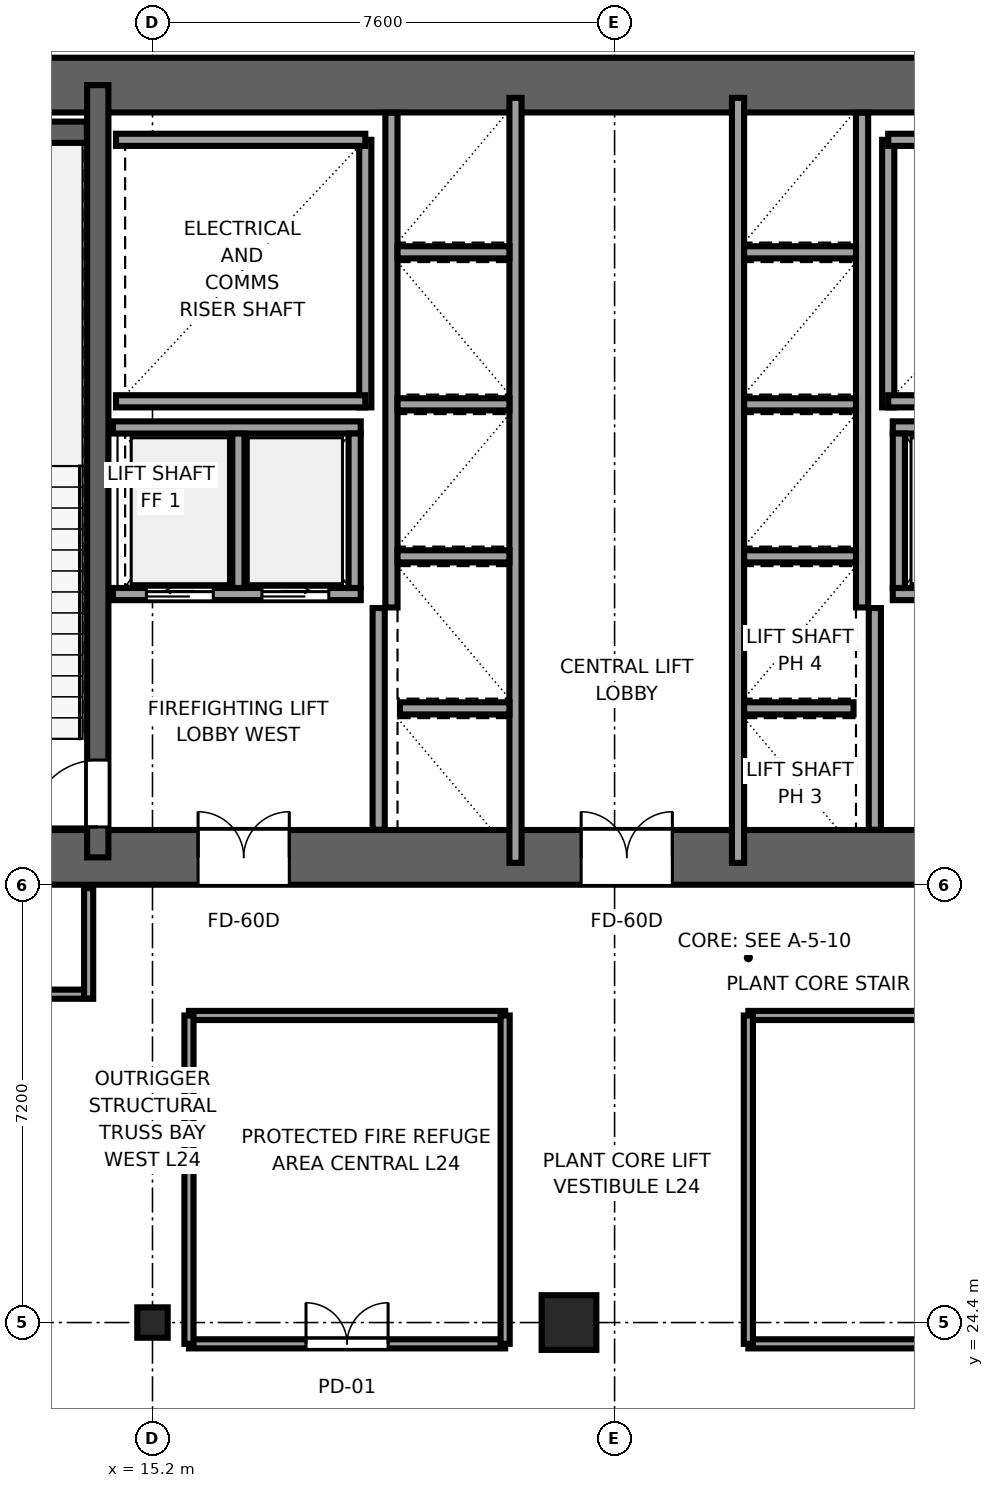
"""IFC4 building model, lengths in metres.
Left out: names, types, materials, properties, quantities, classifications, styles, units other than length and angle.
Written with IfcOpenShell. Run it as: python <this file> out.ifc"""

import sys

from ifc_helpers import new_model, si_unit, direction, frame, frame_2d, origin, origin_2d, place, context, subcontext, project, spatial, rectangle, i_section, extrude, source, transform, mapped, element, fill, save


model = new_model("IFC4")
c1 = context("Model", 3, precision=1e-05, world=origin(), true_north=direction((0.0, 1.0)))
c2 = subcontext(c1, "Body", "Model", "MODEL_VIEW")
j1 = project(units=[si_unit("LENGTHUNIT", "METRE"), si_unit("PLANEANGLEUNIT", "RADIAN")], contexts=[c1])
p1 = place(None, origin())
s1 = spatial("IfcSite", under=j1, at=p1, CompositionType="ELEMENT")
p2 = place(p1, origin())
s2 = spatial("IfcBuilding", under=s1, at=p2, CompositionType="ELEMENT")
p3 = place(p2, frame((0.0, 0.0, 95.9)))
s3 = spatial("IfcBuildingStorey", under=s2, at=p3, CompositionType="ELEMENT", Elevation=95.9)
p4 = place(p3, frame((9.6, 32.05, 0.0), z_axis=(0.0, 0.0, 1.0), x_axis=(1.0, 0.0, 0.0)))
e1 = element("IfcWall", 1, at=p4, inside=s3, PredefinedType="SHEAR", context=c2, shape_type="SweptSolid", body=[
    extrude(rectangle(XDim=26.8, YDim=0.9, at=frame_2d((13.4, 0.0))), origin(), (0.0, 0.0, 1.0), 5.0),
])
p5 = place(p4, frame((7.85, 0.0, 0.0), z_axis=(0.0, 0.0, 1.0), x_axis=(-1.0, 0.0, 0.0)))
e2 = element("IfcOpeningElement", 2, at=p5, cuts=e1, PredefinedType="OPENING", context=c2, shape_type="SweptSolid", body=[
    extrude(rectangle(XDim=1.5, YDim=2.04, at=frame_2d((0.75, 1.02))), frame((0.0, 0.46, 0.0), z_axis=(0.0, -1.0, 0.0), x_axis=(1.0, 0.0, 0.0)), (0.0, 0.0, 1.0), 0.92),
])
p6 = place(p4, frame((14.15, 0.0, 0.0), z_axis=(0.0, 0.0, 1.0), x_axis=(-1.0, 0.0, 0.0)))
e3 = element("IfcOpeningElement", 3, at=p6, cuts=e1, PredefinedType="OPENING", context=c2, shape_type="SweptSolid", body=[
    extrude(rectangle(XDim=1.5, YDim=2.04, at=frame_2d((0.75, 1.02))), frame((0.0, 0.46, 0.0), z_axis=(0.0, -1.0, 0.0), x_axis=(1.0, 0.0, 0.0)), (0.0, 0.0, 1.0), 0.92),
])
p7 = place(p4, frame((20.45, 0.0, 0.0), z_axis=(0.0, 0.0, 1.0), x_axis=(-1.0, 0.0, 0.0)))
e4 = element("IfcOpeningElement", 4, at=p7, cuts=e1, PredefinedType="OPENING", context=c2, shape_type="SweptSolid", body=[
    extrude(rectangle(XDim=1.5, YDim=2.04, at=frame_2d((0.75, 1.02))), frame((0.0, 0.46, 0.0), z_axis=(0.0, -1.0, 0.0), x_axis=(1.0, 0.0, 0.0)), (0.0, 0.0, 1.0), 0.92),
])
p8 = place(p3, frame((9.6, 44.75, 0.0), z_axis=(0.0, 0.0, 1.0), x_axis=(1.0, 0.0, 0.0)))
e5 = element("IfcWall", 5, at=p8, inside=s3, PredefinedType="SHEAR", context=c2, shape_type="SweptSolid", body=[
    extrude(rectangle(XDim=26.8, YDim=0.9, at=frame_2d((13.4, 0.0))), origin(), (0.0, 0.0, 1.0), 5.0),
])
p9 = place(p3, frame((14.3, 32.05, 0.0), z_axis=(0.0, 0.0, 1.0), x_axis=(0.0, 1.0, 0.0)))
e6 = element("IfcWall", 6, at=p9, inside=s3, PredefinedType="SHEAR", context=c2, shape_type="SweptSolid", body=[
    extrude(rectangle(XDim=12.7, YDim=0.35, at=frame_2d((6.35, 0.0))), origin(), (0.0, 0.0, 1.0), 5.0),
])
p10 = place(p9, frame((0.5, 0.0, 0.0)))
e7 = element("IfcOpeningElement", 7, at=p10, cuts=e6, PredefinedType="OPENING", context=c2, shape_type="SweptSolid", body=[
    extrude(rectangle(XDim=1.1, YDim=2.12, at=frame_2d((0.55, 1.06))), frame((0.0, 0.185, 0.0), z_axis=(0.0, -1.0, 0.0), x_axis=(1.0, 0.0, 0.0)), (0.0, 0.0, 1.0), 0.37),
])
p11 = place(p3, frame((10.52, 43.975, 0.0), z_axis=(0.0, 0.0, 1.0), x_axis=(1.0, 0.0, 0.0)))
e8 = element("IfcWall", 8, at=p11, inside=s3, PredefinedType="SHEAR", context=c2, shape_type="SweptSolid", body=[
    extrude(rectangle(XDim=3.6, YDim=0.35, at=frame_2d((1.8, 0.0))), origin(), (0.0, 0.0, 1.0), 5.0),
])
m1 = source(origin(), c2, "Body", "SweptSolid", [
    extrude(i_section(OverallWidth=0.5, OverallDepth=0.5, WebThickness=0.022, FlangeThickness=0.034, at=origin_2d()), origin(), (0.0, 0.0, 1.0), 5.0),
])
p12 = place(p3, frame((15.2, 24.4, 0.0), z_axis=(0.0, 0.0, 1.0), x_axis=(1.0, 0.0, 0.0)))
e9 = element("IfcColumn", 9, at=p12, inside=s3, PredefinedType="COLUMN", context=c2, shape_type="MappedRepresentation", body=[
    mapped(m1, transform((0.0, 0.0, 0.0), x_axis=(1.0, 0.0, 0.0), y_axis=(0.0, 1.0, 0.0), z_axis=(0.0, 0.0, 1.0), scale=1.0)),
])
m2 = source(origin(), c2, "Body", "SweptSolid", [
    extrude(rectangle(XDim=0.9, YDim=0.9, at=origin_2d()), origin(), (0.0, 0.0, 1.0), 5.0),
])
p13 = place(p3, frame((22.05, 24.4, 0.0), z_axis=(0.0, 0.0, 1.0), x_axis=(1.0, 0.0, 0.0)))
e10 = element("IfcColumn", 10, at=p13, inside=s3, PredefinedType="COLUMN", context=c2, shape_type="MappedRepresentation", body=[
    mapped(m2, transform((0.0, 0.0, 0.0), x_axis=(1.0, 0.0, 0.0), y_axis=(0.0, 1.0, 0.0), z_axis=(0.0, 0.0, 1.0), scale=1.0)),
])
p14 = place(p3, frame((18.7, 39.45, 0.0), z_axis=(0.0, 0.0, 1.0), x_axis=(0.0, 1.0, 0.0)))
e11 = element("IfcWall", 11, at=p14, inside=s3, PredefinedType="SOLIDWALL", context=c2, shape_type="SweptSolid", body=[
    extrude(rectangle(XDim=4.4, YDim=0.2, at=frame_2d((2.2, 0.0))), origin(), (0.0, 0.0, 1.0), 4.82),
])
for number, where, z_axis, x_axis in (
    (12, (14.6, 39.55, 0.0), (0.0, 0.0, 1.0), (1.0, 0.0, 0.0)),
    (13, (14.6, 43.85, 0.0), (0.0, 0.0, 1.0), (1.0, 0.0, 0.0)),
):
    element("IfcWall", number, at=place(p3, frame(where, z_axis=z_axis, x_axis=x_axis)), inside=s3, PredefinedType="SOLIDWALL", context=c2, shape_type="SweptSolid", body=[
        extrude(rectangle(XDim=4.1, YDim=0.2, at=frame_2d((2.05, 0.0))), origin(), (0.0, 0.0, 1.0), 4.82),
    ])
p15 = place(p3, frame((27.3, 39.45, 0.0), z_axis=(0.0, 0.0, 1.0), x_axis=(0.0, 1.0, 0.0)))
e14 = element("IfcWall", 14, at=p15, inside=s3, PredefinedType="SOLIDWALL", context=c2, shape_type="SweptSolid", body=[
    extrude(rectangle(XDim=4.4, YDim=0.2, at=frame_2d((2.2, 0.0))), origin(), (0.0, 0.0, 1.0), 4.82),
])
for number, where, z_axis, x_axis in (
    (15, (27.3, 39.55, 0.0), (0.0, 0.0, 1.0), (1.0, 0.0, 0.0)),
    (16, (27.3, 43.85, 0.0), (0.0, 0.0, 1.0), (1.0, 0.0, 0.0)),
):
    element("IfcWall", number, at=place(p3, frame(where, z_axis=z_axis, x_axis=x_axis)), inside=s3, PredefinedType="SOLIDWALL", context=c2, shape_type="SweptSolid", body=[
        extrude(rectangle(XDim=4.1, YDim=0.2, at=frame_2d((2.05, 0.0))), origin(), (0.0, 0.0, 1.0), 4.82),
    ])
for number, where, z_axis, x_axis in (
    (17, (18.92, 32.504, 0.0), (0.0, 0.0, 1.0), (0.0, 1.0, 0.0)),
    (18, (27.08, 32.504, 0.0), (0.0, 0.0, 1.0), (0.0, 1.0, 0.0)),
):
    element("IfcWall", number, at=place(p3, frame(where, z_axis=z_axis, x_axis=x_axis)), inside=s3, PredefinedType="SOLIDWALL", context=c2, shape_type="SweptSolid", body=[
        extrude(rectangle(XDim=3.646, YDim=0.2, at=frame_2d((1.823, 0.0))), origin(), (0.0, 0.0, 1.0), 4.82),
    ])
p16 = place(p3, frame((21.17, 31.96, 0.0), z_axis=(0.0, 0.0, 1.0), x_axis=(0.0, 1.0, 0.0)))
e19 = element("IfcWall", 19, at=p16, inside=s3, PredefinedType="SOLIDWALL", context=c2, shape_type="SweptSolid", body=[
    extrude(rectangle(XDim=12.58, YDim=0.2, at=frame_2d((6.29, 0.0))), origin(), (0.0, 0.0, 1.0), 4.82),
])
p17 = place(p3, frame((19.13, 36.16, 0.0), z_axis=(0.0, 0.0, 1.0), x_axis=(0.0, 1.0, 0.0)))
e20 = element("IfcWall", 20, at=p17, inside=s3, PredefinedType="SOLIDWALL", context=c2, shape_type="SweptSolid", body=[
    extrude(rectangle(XDim=8.136, YDim=0.2, at=frame_2d((4.068, 0.0))), origin(), (0.0, 0.0, 1.0), 4.82),
])
p18 = place(p3, frame((19.27, 34.5, 0.0), z_axis=(0.0, 0.0, 1.0), x_axis=(1.0, 0.0, 0.0)))
e21 = element("IfcWall", 21, at=p18, inside=s3, PredefinedType="SOLIDWALL", context=c2, shape_type="SweptSolid", body=[
    extrude(rectangle(XDim=1.8, YDim=0.2, at=frame_2d((0.9, 0.0))), origin(), (0.0, 0.0, 1.0), 4.82),
])
for number, where, z_axis, x_axis in (
    (22, (19.23, 37.0, 0.0), (0.0, 0.0, 1.0), (1.0, 0.0, 0.0)),
    (23, (19.23, 39.5, 0.0), (0.0, 0.0, 1.0), (1.0, 0.0, 0.0)),
    (24, (19.23, 42.0, 0.0), (0.0, 0.0, 1.0), (1.0, 0.0, 0.0)),
):
    element("IfcWall", number, at=place(p3, frame(where, z_axis=z_axis, x_axis=x_axis)), inside=s3, PredefinedType="SOLIDWALL", context=c2, shape_type="SweptSolid", body=[
        extrude(rectangle(XDim=1.84, YDim=0.2, at=frame_2d((0.92, 0.0))), origin(), (0.0, 0.0, 1.0), 4.82),
    ])
p19 = place(p3, frame((27.375, 36.38, 0.0), z_axis=(0.0, 0.0, 1.0), x_axis=(1.0, 0.0, 0.0)))
e25 = element("IfcWall", 25, at=p19, inside=s3, PredefinedType="SOLIDWALL", context=c2, shape_type="SweptSolid", body=[
    extrude(rectangle(XDim=4.075, YDim=0.2, at=frame_2d((2.038, 0.0))), origin(), (0.0, 0.0, 1.0), 4.82),
])
p20 = place(p19, frame((0.525, 0.0, 0.0)))
e26 = element("IfcOpeningElement", 26, at=p20, cuts=e25, PredefinedType="OPENING", context=c2, shape_type="SweptSolid", body=[
    extrude(rectangle(XDim=1.1, YDim=2.12, at=frame_2d((0.55, 1.06))), frame((0.0, 0.11, 0.0), z_axis=(0.0, -1.0, 0.0), x_axis=(1.0, 0.0, 0.0)), (0.0, 0.0, 1.0), 0.22),
])
p21 = place(p19, frame((2.425, 0.0, 0.0)))
e27 = element("IfcOpeningElement", 27, at=p21, cuts=e25, PredefinedType="OPENING", context=c2, shape_type="SweptSolid", body=[
    extrude(rectangle(XDim=1.1, YDim=2.12, at=frame_2d((0.55, 1.06))), frame((0.0, 0.11, 0.0), z_axis=(0.0, -1.0, 0.0), x_axis=(1.0, 0.0, 0.0)), (0.0, 0.0, 1.0), 0.22),
])
p22 = place(p3, frame((27.375, 39.12, 0.0), z_axis=(0.0, 0.0, 1.0), x_axis=(1.0, 0.0, 0.0)))
e28 = element("IfcWall", 28, at=p22, inside=s3, PredefinedType="SOLIDWALL", context=c2, shape_type="SweptSolid", body=[
    extrude(rectangle(XDim=4.075, YDim=0.2, at=frame_2d((2.038, 0.0))), origin(), (0.0, 0.0, 1.0), 4.82),
])
p23 = place(p3, frame((27.475, 36.48, 0.0), z_axis=(0.0, 0.0, 1.0), x_axis=(0.0, 1.0, 0.0)))
e29 = element("IfcWall", 29, at=p23, inside=s3, PredefinedType="SOLIDWALL", context=c2, shape_type="SweptSolid", body=[
    extrude(rectangle(XDim=2.54, YDim=0.2, at=frame_2d((1.27, 0.0))), origin(), (0.0, 0.0, 1.0), 4.82),
])
p24 = place(p3, frame((14.55, 36.38, 0.0), z_axis=(0.0, 0.0, 1.0), x_axis=(1.0, 0.0, 0.0)))
e30 = element("IfcWall", 30, at=p24, inside=s3, PredefinedType="SOLIDWALL", context=c2, shape_type="SweptSolid", body=[
    extrude(rectangle(XDim=4.075, YDim=0.2, at=frame_2d((2.038, 0.0))), origin(), (0.0, 0.0, 1.0), 4.82),
])
p25 = place(p24, frame((0.55, 0.0, 0.0)))
e31 = element("IfcOpeningElement", 31, at=p25, cuts=e30, PredefinedType="OPENING", context=c2, shape_type="SweptSolid", body=[
    extrude(rectangle(XDim=1.1, YDim=2.12, at=frame_2d((0.55, 1.06))), frame((0.0, 0.11, 0.0), z_axis=(0.0, -1.0, 0.0), x_axis=(1.0, 0.0, 0.0)), (0.0, 0.0, 1.0), 0.22),
])
p26 = place(p24, frame((2.45, 0.0, 0.0)))
e32 = element("IfcOpeningElement", 32, at=p26, cuts=e30, PredefinedType="OPENING", context=c2, shape_type="SweptSolid", body=[
    extrude(rectangle(XDim=1.1, YDim=2.12, at=frame_2d((0.55, 1.06))), frame((0.0, 0.11, 0.0), z_axis=(0.0, -1.0, 0.0), x_axis=(1.0, 0.0, 0.0)), (0.0, 0.0, 1.0), 0.22),
])
p27 = place(p3, frame((14.55, 39.12, 0.0), z_axis=(0.0, 0.0, 1.0), x_axis=(1.0, 0.0, 0.0)))
e33 = element("IfcWall", 33, at=p27, inside=s3, PredefinedType="SOLIDWALL", context=c2, shape_type="SweptSolid", body=[
    extrude(rectangle(XDim=4.075, YDim=0.2, at=frame_2d((2.038, 0.0))), origin(), (0.0, 0.0, 1.0), 4.82),
])
for number, where, z_axis, x_axis in (
    (34, (18.525, 36.48, 0.0), (0.0, 0.0, 1.0), (0.0, 1.0, 0.0)),
    (35, (16.613, 36.48, 0.0), (0.0, 0.0, 1.0), (0.0, 1.0, 0.0)),
):
    element("IfcWall", number, at=place(p3, frame(where, z_axis=z_axis, x_axis=x_axis)), inside=s3, PredefinedType="SOLIDWALL", context=c2, shape_type="SweptSolid", body=[
        extrude(rectangle(XDim=2.54, YDim=0.2, at=frame_2d((1.27, 0.0))), origin(), (0.0, 0.0, 1.0), 4.82),
    ])
p28 = place(p3, frame((24.83, 31.96, 0.0), z_axis=(0.0, 0.0, 1.0), x_axis=(0.0, 1.0, 0.0)))
e36 = element("IfcWall", 36, at=p28, inside=s3, PredefinedType="SOLIDWALL", context=c2, shape_type="SweptSolid", body=[
    extrude(rectangle(XDim=12.58, YDim=0.2, at=frame_2d((6.29, 0.0))), origin(), (0.0, 0.0, 1.0), 4.82),
])
p29 = place(p3, frame((26.87, 36.16, 0.0), z_axis=(0.0, 0.0, 1.0), x_axis=(0.0, 1.0, 0.0)))
e37 = element("IfcWall", 37, at=p29, inside=s3, PredefinedType="SOLIDWALL", context=c2, shape_type="SweptSolid", body=[
    extrude(rectangle(XDim=8.136, YDim=0.2, at=frame_2d((4.068, 0.0))), origin(), (0.0, 0.0, 1.0), 4.82),
])
p30 = place(p3, frame((24.93, 34.5, 0.0), z_axis=(0.0, 0.0, 1.0), x_axis=(1.0, 0.0, 0.0)))
e38 = element("IfcWall", 38, at=p30, inside=s3, PredefinedType="SOLIDWALL", context=c2, shape_type="SweptSolid", body=[
    extrude(rectangle(XDim=1.8, YDim=0.2, at=frame_2d((0.9, 0.0))), origin(), (0.0, 0.0, 1.0), 4.82),
])
for number, where, z_axis, x_axis in (
    (39, (24.93, 37.0, 0.0), (0.0, 0.0, 1.0), (1.0, 0.0, 0.0)),
    (40, (24.93, 39.5, 0.0), (0.0, 0.0, 1.0), (1.0, 0.0, 0.0)),
    (41, (24.93, 42.0, 0.0), (0.0, 0.0, 1.0), (1.0, 0.0, 0.0)),
):
    element("IfcWall", number, at=place(p3, frame(where, z_axis=z_axis, x_axis=x_axis)), inside=s3, PredefinedType="SOLIDWALL", context=c2, shape_type="SweptSolid", body=[
        extrude(rectangle(XDim=1.84, YDim=0.2, at=frame_2d((0.92, 0.0))), origin(), (0.0, 0.0, 1.0), 4.82),
    ])
p31 = place(p3, frame((15.8, 24.05, 0.0), z_axis=(0.0, 0.0, 1.0), x_axis=(1.0, 0.0, 0.0)))
e42 = element("IfcWall", 42, at=p31, inside=s3, PredefinedType="PARTITIONING", context=c2, shape_type="SweptSolid", body=[
    extrude(rectangle(XDim=5.2, YDim=0.15, at=frame_2d((2.6, 0.0))), origin(), (0.0, 0.0, 1.0), 4.82),
])
p32 = place(p31, frame((1.925, 0.0, 0.0)))
e43 = element("IfcOpeningElement", 43, at=p32, cuts=e42, PredefinedType="OPENING", context=c2, shape_type="SweptSolid", body=[
    extrude(rectangle(XDim=1.35, YDim=2.15, at=frame_2d((0.675, 1.075))), frame((0.0, 0.085, 0.0), z_axis=(0.0, -1.0, 0.0), x_axis=(1.0, 0.0, 0.0)), (0.0, 0.0, 1.0), 0.17),
])
p33 = place(p3, frame((15.8, 29.45, 0.0), z_axis=(0.0, 0.0, 1.0), x_axis=(1.0, 0.0, 0.0)))
e44 = element("IfcWall", 44, at=p33, inside=s3, PredefinedType="PARTITIONING", context=c2, shape_type="SweptSolid", body=[
    extrude(rectangle(XDim=5.2, YDim=0.15, at=frame_2d((2.6, 0.0))), origin(), (0.0, 0.0, 1.0), 4.82),
])
for number, where, z_axis, x_axis in (
    (45, (15.8, 24.05, 0.0), (0.0, 0.0, 1.0), (0.0, 1.0, 0.0)),
    (46, (21.0, 24.05, 0.0), (0.0, 0.0, 1.0), (0.0, 1.0, 0.0)),
):
    element("IfcWall", number, at=place(p3, frame(where, z_axis=z_axis, x_axis=x_axis)), inside=s3, PredefinedType="PARTITIONING", context=c2, shape_type="SweptSolid", body=[
        extrude(rectangle(XDim=5.4, YDim=0.15, at=frame_2d((2.7, 0.0))), origin(), (0.0, 0.0, 1.0), 4.82),
    ])
p34 = place(p3, frame((25.0, 24.05, 0.0), z_axis=(0.0, 0.0, 1.0), x_axis=(1.0, 0.0, 0.0)))
e47 = element("IfcWall", 47, at=p34, inside=s3, PredefinedType="PARTITIONING", context=c2, shape_type="SweptSolid", body=[
    extrude(rectangle(XDim=9.35, YDim=0.15, at=frame_2d((4.675, 0.0))), origin(), (0.0, 0.0, 1.0), 4.82),
])
p35 = place(p34, frame((4.95, 0.0, 0.0)))
e48 = element("IfcOpeningElement", 48, at=p35, cuts=e47, PredefinedType="OPENING", context=c2, shape_type="SweptSolid", body=[
    extrude(rectangle(XDim=1.35, YDim=2.15, at=frame_2d((0.675, 1.075))), frame((0.0, 0.085, 0.0), z_axis=(0.0, -1.0, 0.0), x_axis=(1.0, 0.0, 0.0)), (0.0, 0.0, 1.0), 0.17),
])
p36 = place(p3, frame((25.0, 29.45, 0.0), z_axis=(0.0, 0.0, 1.0), x_axis=(1.0, 0.0, 0.0)))
e49 = element("IfcWall", 49, at=p36, inside=s3, PredefinedType="PARTITIONING", context=c2, shape_type="SweptSolid", body=[
    extrude(rectangle(XDim=9.35, YDim=0.15, at=frame_2d((4.675, 0.0))), origin(), (0.0, 0.0, 1.0), 4.82),
])
p37 = place(p3, frame((25.0, 24.05, 0.0), z_axis=(0.0, 0.0, 1.0), x_axis=(0.0, 1.0, 0.0)))
e50 = element("IfcWall", 50, at=p37, inside=s3, PredefinedType="PARTITIONING", context=c2, shape_type="SweptSolid", body=[
    extrude(rectangle(XDim=5.4, YDim=0.15, at=frame_2d((2.7, 0.0))), origin(), (0.0, 0.0, 1.0), 4.82),
])
p38 = place(p3, frame((9.83, 29.8, 0.0), z_axis=(0.0, 0.0, 1.0), x_axis=(1.0, 0.0, 0.0)))
e51 = element("IfcWall", 51, at=p38, inside=s3, PredefinedType="PARTITIONING", context=c2, shape_type="SweptSolid", body=[
    extrude(rectangle(XDim=4.39, YDim=0.15, at=frame_2d((2.195, 0.0))), origin(), (0.0, 0.0, 1.0), 4.82),
])
p39 = place(p3, frame((14.15, 29.73, 0.0), z_axis=(0.0, 0.0, 1.0), x_axis=(0.0, 1.0, 0.0)))
e52 = element("IfcWall", 52, at=p39, inside=s3, PredefinedType="PARTITIONING", context=c2, shape_type="SweptSolid", body=[
    extrude(rectangle(XDim=1.815, YDim=0.15, at=frame_2d((0.907, 0.0))), origin(), (0.0, 0.0, 1.0), 4.82),
])
m3 = source(origin(), c2, "Body", "SweptSolid", [
    extrude(rectangle(XDim=1.1, YDim=2.12, at=frame_2d((0.55, 1.06))), frame((0.0, 0.025, 0.0), z_axis=(0.0, -1.0, 0.0), x_axis=(1.0, 0.0, 0.0)), (0.0, 0.0, 1.0), 0.05),
])
p40 = place(p10, origin())
e53 = element("IfcDoor", 53, at=p40, inside=s3, OperationType="SINGLE_SWING_LEFT", PredefinedType="DOOR", context=c2, shape_type="MappedRepresentation", body=[
    mapped(m3, transform((0.0, 0.0, 0.0), x_axis=(1.0, 0.0, 0.0), y_axis=(0.0, 1.0, 0.0), z_axis=(0.0, 0.0, 1.0), scale=1.0)),
])
fill(e7, e53)
m4 = source(origin(), c2, "Body", "SweptSolid", [
    extrude(rectangle(XDim=1.5, YDim=2.04, at=frame_2d((0.75, 1.02))), frame((0.0, 0.025, 0.0), z_axis=(0.0, -1.0, 0.0), x_axis=(1.0, 0.0, 0.0)), (0.0, 0.0, 1.0), 0.05),
])
p41 = place(p5, origin())
e54 = element("IfcDoor", 54, at=p41, inside=s3, OperationType="DOUBLE_DOOR_SINGLE_SWING", PredefinedType="DOOR", context=c2, shape_type="MappedRepresentation", body=[
    mapped(m4, transform((0.0, 0.0, 0.0), x_axis=(1.0, 0.0, 0.0), y_axis=(0.0, 1.0, 0.0), z_axis=(0.0, 0.0, 1.0), scale=1.0)),
])
fill(e2, e54)
p42 = place(p6, origin())
e55 = element("IfcDoor", 55, at=p42, inside=s3, OperationType="DOUBLE_DOOR_SINGLE_SWING", PredefinedType="DOOR", context=c2, shape_type="MappedRepresentation", body=[
    mapped(m4, transform((0.0, 0.0, 0.0), x_axis=(1.0, 0.0, 0.0), y_axis=(0.0, 1.0, 0.0), z_axis=(0.0, 0.0, 1.0), scale=1.0)),
])
fill(e3, e55)
m5 = source(origin(), c2, "Body", "SweptSolid", [
    extrude(rectangle(XDim=1.1, YDim=2.12, at=frame_2d((0.55, 1.06))), frame((0.0, 0.025, 0.0), z_axis=(0.0, -1.0, 0.0), x_axis=(1.0, 0.0, 0.0)), (0.0, 0.0, 1.0), 0.05),
])
p43 = place(p25, origin())
e56 = element("IfcDoor", 56, at=p43, inside=s3, OperationType="SLIDING_TO_LEFT", PredefinedType="DOOR", context=c2, shape_type="MappedRepresentation", body=[
    mapped(m5, transform((0.0, 0.0, 0.0), x_axis=(1.0, 0.0, 0.0), y_axis=(0.0, 1.0, 0.0), z_axis=(0.0, 0.0, 1.0), scale=1.0)),
])
fill(e31, e56)
p44 = place(p26, origin())
e57 = element("IfcDoor", 57, at=p44, inside=s3, OperationType="SLIDING_TO_RIGHT", PredefinedType="DOOR", context=c2, shape_type="MappedRepresentation", body=[
    mapped(m5, transform((0.0, 0.0, 0.0), x_axis=(1.0, 0.0, 0.0), y_axis=(0.0, 1.0, 0.0), z_axis=(0.0, 0.0, 1.0), scale=1.0)),
])
fill(e32, e57)
m6 = source(origin(), c2, "Body", "SweptSolid", [
    extrude(rectangle(XDim=1.35, YDim=2.15, at=frame_2d((0.675, 1.075))), frame((0.0, 0.025, 0.0), z_axis=(0.0, -1.0, 0.0), x_axis=(1.0, 0.0, 0.0)), (0.0, 0.0, 1.0), 0.05),
])
p45 = place(p32, origin())
e58 = element("IfcDoor", 58, at=p45, inside=s3, OperationType="DOUBLE_DOOR_SINGLE_SWING", PredefinedType="DOOR", context=c2, shape_type="MappedRepresentation", body=[
    mapped(m6, transform((0.0, 0.0, 0.0), x_axis=(1.0, 0.0, 0.0), y_axis=(0.0, 1.0, 0.0), z_axis=(0.0, 0.0, 1.0), scale=1.0)),
])
fill(e43, e58)
save(model, sys.argv[1])
